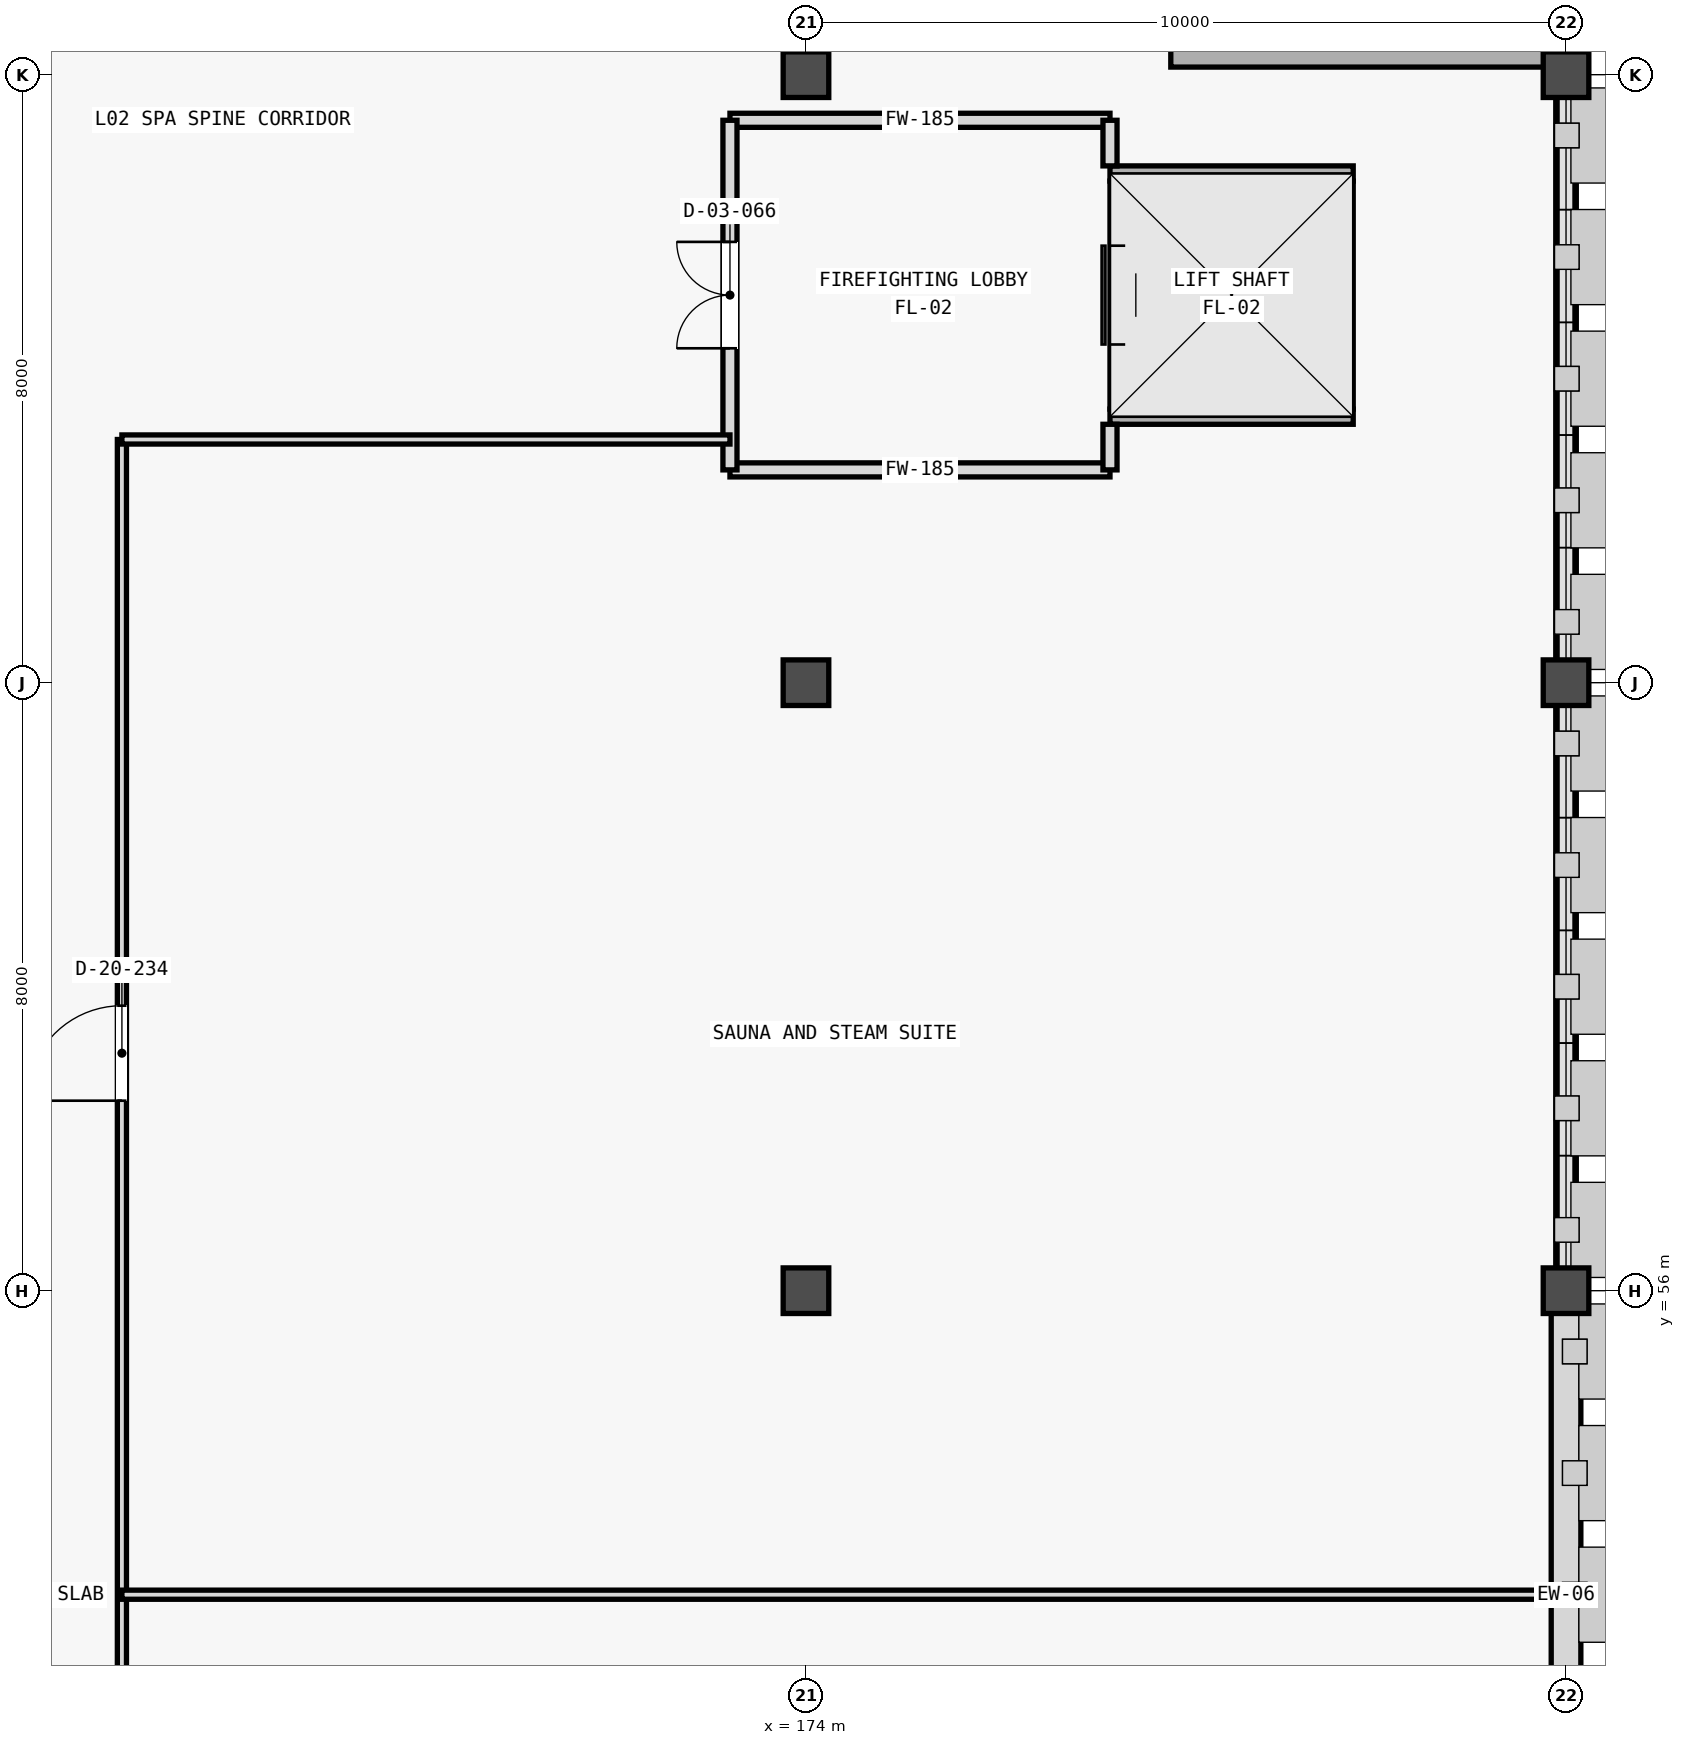
"""IFC4 building model, lengths in metres.
Left out: names, types, materials, properties, quantities, classifications, styles, units other than length and angle.
Written with IfcOpenShell. Run it as: python <this file> out.ifc"""

import sys

from ifc_helpers import new_model, si_unit, direction, frame, frame_2d, origin, origin_2d, place, context, subcontext, project, spatial, rectangle, extrude, element, fill, save


model = new_model("IFC4")
c1 = context("Model", 3, precision=1e-05, world=origin(), true_north=direction((0.0, 1.0)))
c2 = subcontext(c1, "Body", "Model", "MODEL_VIEW")
j1 = project(units=[si_unit("LENGTHUNIT", "METRE"), si_unit("PLANEANGLEUNIT", "RADIAN")], contexts=[c1])
p1 = place(None, origin())
s1 = spatial("IfcSite", under=j1, at=p1, CompositionType="ELEMENT")
p2 = place(p1, origin())
s2 = spatial("IfcBuilding", under=s1, at=p2, CompositionType="ELEMENT")
p3 = place(p2, frame((0.0, 0.0, 10.2)))
s3 = spatial("IfcBuildingStorey", under=s2, at=p3, CompositionType="ELEMENT", Elevation=10.2)
for number, where, z_axis, x_axis in (
    (1, (174.0, 56.0, 0.0), (0.0, 0.0, 1.0), (1.0, 0.0, 0.0)),
    (2, (184.0, 56.0, 0.0), (0.0, 0.0, 1.0), (1.0, 0.0, 0.0)),
    (3, (174.0, 64.0, 0.0), (0.0, 0.0, 1.0), (1.0, 0.0, 0.0)),
    (4, (184.0, 64.0, 0.0), (0.0, 0.0, 1.0), (1.0, 0.0, 0.0)),
    (5, (174.0, 72.0, 0.0), (0.0, 0.0, 1.0), (1.0, 0.0, 0.0)),
    (6, (184.0, 72.0, 0.0), (0.0, 0.0, 1.0), (1.0, 0.0, 0.0)),
):
    element("IfcColumn", number, at=place(p3, frame(where, z_axis=z_axis, x_axis=x_axis)), inside=s3, PredefinedType="COLUMN", context=c2, shape_type="SweptSolid", body=[
        extrude(rectangle(XDim=0.6, YDim=0.6, at=origin_2d()), origin(), (0.0, 0.0, 1.0), 3.96),
    ])
p4 = place(p3, frame((184.0, 48.296, 0.0), z_axis=(0.0, 0.0, 1.0), x_axis=(0.0, 1.0, 0.0)))
e7 = element("IfcWall", 7, at=p4, inside=s3, PredefinedType="STANDARD", context=c2, shape_type="SweptSolid", body=[
    extrude(rectangle(XDim=7.408, YDim=0.39, at=frame_2d((3.704, 0.0))), origin(), (0.0, 0.0, 1.0), 3.3),
])
for number, where, z_axis, x_axis in (
    (8, (184.0, 56.296, 0.0), (0.0, 0.0, 1.0), (0.0, 1.0, 0.0)),
    (9, (184.0, 64.296, 0.0), (0.0, 0.0, 1.0), (0.0, 1.0, 0.0)),
):
    element("IfcWall", number, at=place(p3, frame(where, z_axis=z_axis, x_axis=x_axis)), inside=s3, PredefinedType="STANDARD", context=c2, shape_type="SweptSolid", body=[
        extrude(rectangle(XDim=7.408, YDim=0.27, at=frame_2d((3.704, 0.0))), origin(), (0.0, 0.0, 1.0), 0.8),
    ])
p5 = place(p3, frame((184.0, 72.296, 0.0), z_axis=(0.0, 0.0, 1.0), x_axis=(0.0, 1.0, 0.0)))
e10 = element("IfcWall", 10, at=p5, inside=s3, PredefinedType="SHEAR", context=c2, shape_type="SweptSolid", body=[
    extrude(rectangle(XDim=7.408, YDim=0.3, at=frame_2d((3.704, 0.0))), origin(), (0.0, 0.0, 1.0), 4.2),
])
p6 = place(p3, frame((178.8, 72.225, 0.0), z_axis=(0.0, 0.0, 1.0), x_axis=(1.0, 0.0, 0.0)))
e11 = element("IfcWall", 11, at=p6, inside=s3, PredefinedType="SHEAR", context=c2, shape_type="SweptSolid", body=[
    extrude(rectangle(XDim=5.2, YDim=0.25, at=frame_2d((2.6, 0.0))), origin(), (0.0, 0.0, 1.0), 4.2),
])
for number, where, z_axis, x_axis in (
    (12, (178.0, 67.5, 0.0), (0.0, 0.0, 1.0), (1.0, 0.0, 0.0)),
    (13, (178.0, 70.7, 0.0), (0.0, 0.0, 1.0), (1.0, 0.0, 0.0)),
):
    element("IfcWall", number, at=place(p3, frame(where, z_axis=z_axis, x_axis=x_axis)), inside=s3, PredefinedType="SHEAR", context=c2, shape_type="SweptSolid", body=[
        extrude(rectangle(XDim=3.2, YDim=0.2, at=frame_2d((1.6, 0.0))), origin(), (0.0, 0.0, 1.0), 4.2),
    ])
p7 = place(p3, frame((178.1, 67.6, 0.0), z_axis=(0.0, 0.0, 1.0), x_axis=(0.0, 1.0, 0.0)))
e14 = element("IfcWall", 14, at=p7, inside=s3, PredefinedType="SHEAR", context=c2, shape_type="SweptSolid", body=[
    extrude(rectangle(XDim=3.0, YDim=0.2, at=frame_2d((1.5, 0.0))), origin(), (0.0, 0.0, 1.0), 4.2),
])
p8 = place(p7, frame((0.85, 0.0, 0.0)))
e15 = element("IfcOpeningElement", 15, at=p8, cuts=e14, PredefinedType="OPENING", context=c2, shape_type="SweptSolid", body=[
    extrude(rectangle(XDim=1.3, YDim=2.3, at=frame_2d((0.65, 1.15))), frame((0.0, 0.11, 0.0), z_axis=(0.0, -1.0, 0.0), x_axis=(1.0, 0.0, 0.0)), (0.0, 0.0, 1.0), 0.22),
])
p9 = place(p3, frame((181.1, 67.6, 0.0), z_axis=(0.0, 0.0, 1.0), x_axis=(0.0, 1.0, 0.0)))
e16 = element("IfcWall", 16, at=p9, inside=s3, PredefinedType="SHEAR", context=c2, shape_type="SweptSolid", body=[
    extrude(rectangle(XDim=3.0, YDim=0.2, at=frame_2d((1.5, 0.0))), origin(), (0.0, 0.0, 1.0), 4.2),
])
for number, where, z_axis, x_axis in (
    (17, (178.0, 66.8, 0.0), (0.0, 0.0, 1.0), (-1.0, 0.0, 0.0)),
    (18, (173.0, 71.4, 0.0), (0.0, 0.0, 1.0), (1.0, 0.0, 0.0)),
):
    element("IfcWall", number, at=place(p3, frame(where, z_axis=z_axis, x_axis=x_axis)), inside=s3, PredefinedType="STANDARD", context=c2, shape_type="SweptSolid", body=[
        extrude(rectangle(XDim=5.0, YDim=0.185, at=frame_2d((2.5, 0.0))), origin(), (0.0, 0.0, 1.0), 3.24),
    ])
p10 = place(p3, frame((173.0, 66.8, 0.0), z_axis=(0.0, 0.0, 1.0), x_axis=(0.0, 1.0, 0.0)))
e19 = element("IfcWall", 19, at=p10, inside=s3, PredefinedType="STANDARD", context=c2, shape_type="SweptSolid", body=[
    extrude(rectangle(XDim=4.6, YDim=0.185, at=frame_2d((2.3, 0.0))), origin(), (0.0, 0.0, 1.0), 3.24),
])
p11 = place(p10, frame((1.6, 0.0, 0.0)))
e20 = element("IfcOpeningElement", 20, at=p11, cuts=e19, PredefinedType="OPENING", context=c2, shape_type="SweptSolid", body=[
    extrude(rectangle(XDim=1.4, YDim=2.2, at=frame_2d((0.7, 1.1))), frame((0.0, 0.103, 0.0), z_axis=(0.0, -1.0, 0.0), x_axis=(1.0, 0.0, 0.0)), (0.0, 0.0, 1.0), 0.205),
])
for number, where, z_axis, x_axis in (
    (21, (178.0, 66.8, 0.0), (0.0, 0.0, 1.0), (0.0, 1.0, 0.0)),
    (22, (178.0, 70.8, 0.0), (0.0, 0.0, 1.0), (0.0, 1.0, 0.0)),
):
    element("IfcWall", number, at=place(p3, frame(where, z_axis=z_axis, x_axis=x_axis)), inside=s3, PredefinedType="STANDARD", context=c2, shape_type="SweptSolid", body=[
        extrude(rectangle(XDim=0.6, YDim=0.185, at=frame_2d((0.3, 0.0))), origin(), (0.0, 0.0, 1.0), 3.24),
    ])
p12 = place(p3, frame((165.0, 35.4, 0.0), z_axis=(0.0, 0.0, 1.0), x_axis=(0.0, 1.0, 0.0)))
e23 = element("IfcWall", 23, at=p12, inside=s3, PredefinedType="PARTITIONING", context=c2, shape_type="SweptSolid", body=[
    extrude(rectangle(XDim=31.8, YDim=0.12, at=frame_2d((15.9, 0.0))), origin(), (0.0, 0.0, 1.0), 3.24),
])
p13 = place(p12, frame((3.1, 0.0, 0.0)))
e24 = element("IfcOpeningElement", 24, at=p13, cuts=e23, PredefinedType="OPENING", context=c2, shape_type="SweptSolid", body=[
    extrude(rectangle(XDim=1.3, YDim=2.25, at=frame_2d((0.65, 1.125))), frame((0.0, 0.07, 0.0), z_axis=(0.0, -1.0, 0.0), x_axis=(1.0, 0.0, 0.0)), (0.0, 0.0, 1.0), 0.14),
])
p14 = place(p12, frame((11.1, 0.0, 0.0)))
e25 = element("IfcOpeningElement", 25, at=p14, cuts=e23, PredefinedType="OPENING", context=c2, shape_type="SweptSolid", body=[
    extrude(rectangle(XDim=1.3, YDim=2.25, at=frame_2d((0.65, 1.125))), frame((0.0, 0.07, 0.0), z_axis=(0.0, -1.0, 0.0), x_axis=(1.0, 0.0, 0.0)), (0.0, 0.0, 1.0), 0.14),
])
p15 = place(p12, frame((23.1, 0.0, 0.0)))
e26 = element("IfcOpeningElement", 26, at=p15, cuts=e23, PredefinedType="OPENING", context=c2, shape_type="SweptSolid", body=[
    extrude(rectangle(XDim=1.25, YDim=2.25, at=frame_2d((0.625, 1.125))), frame((0.0, 0.07, 0.0), z_axis=(0.0, -1.0, 0.0), x_axis=(1.0, 0.0, 0.0)), (0.0, 0.0, 1.0), 0.14),
])
p16 = place(p3, frame((165.0, 67.2, 0.0), z_axis=(0.0, 0.0, 1.0), x_axis=(1.0, 0.0, 0.0)))
e27 = element("IfcWall", 27, at=p16, inside=s3, PredefinedType="PARTITIONING", context=c2, shape_type="SweptSolid", body=[
    extrude(rectangle(XDim=8.0, YDim=0.12, at=frame_2d((4.0, 0.0))), origin(), (0.0, 0.0, 1.0), 3.67),
])
p17 = place(p3, frame((165.0, 52.0, 0.0), z_axis=(0.0, 0.0, 1.0), x_axis=(1.0, 0.0, 0.0)))
e28 = element("IfcWall", 28, at=p17, inside=s3, PredefinedType="PARTITIONING", context=c2, shape_type="SweptSolid", body=[
    extrude(rectangle(XDim=18.84, YDim=0.12, at=frame_2d((9.42, 0.0))), origin(), (0.0, 0.0, 1.0), 3.24),
])
p18 = place(p8, origin())
e29 = element("IfcDoor", 29, at=p18, inside=s3, OperationType="SLIDING_TO_RIGHT", PredefinedType="DOOR", context=c2, shape_type="SweptSolid", body=[
    extrude(rectangle(XDim=1.3, YDim=2.3, at=frame_2d((0.65, 1.15))), frame((0.0, 0.025, 0.0), z_axis=(0.0, -1.0, 0.0), x_axis=(1.0, 0.0, 0.0)), (0.0, 0.0, 1.0), 0.05),
])
fill(e15, e29)
p19 = place(p11, origin())
e30 = element("IfcDoor", 30, at=p19, inside=s3, OperationType="DOUBLE_DOOR_SINGLE_SWING", PredefinedType="DOOR", context=c2, shape_type="SweptSolid", body=[
    extrude(rectangle(XDim=1.4, YDim=2.2, at=frame_2d((0.7, 1.1))), frame((0.0, 0.025, 0.0), z_axis=(0.0, -1.0, 0.0), x_axis=(1.0, 0.0, 0.0)), (0.0, 0.0, 1.0), 0.05),
])
fill(e20, e30)
p20 = place(p15, origin())
e31 = element("IfcDoor", 31, at=p20, inside=s3, OperationType="SINGLE_SWING_LEFT", PredefinedType="DOOR", context=c2, shape_type="SweptSolid", body=[
    extrude(rectangle(XDim=1.25, YDim=2.25, at=frame_2d((0.625, 1.125))), frame((0.0, 0.025, 0.0), z_axis=(0.0, -1.0, 0.0), x_axis=(1.0, 0.0, 0.0)), (0.0, 0.0, 1.0), 0.05),
])
fill(e26, e31)
save(model, sys.argv[1])
